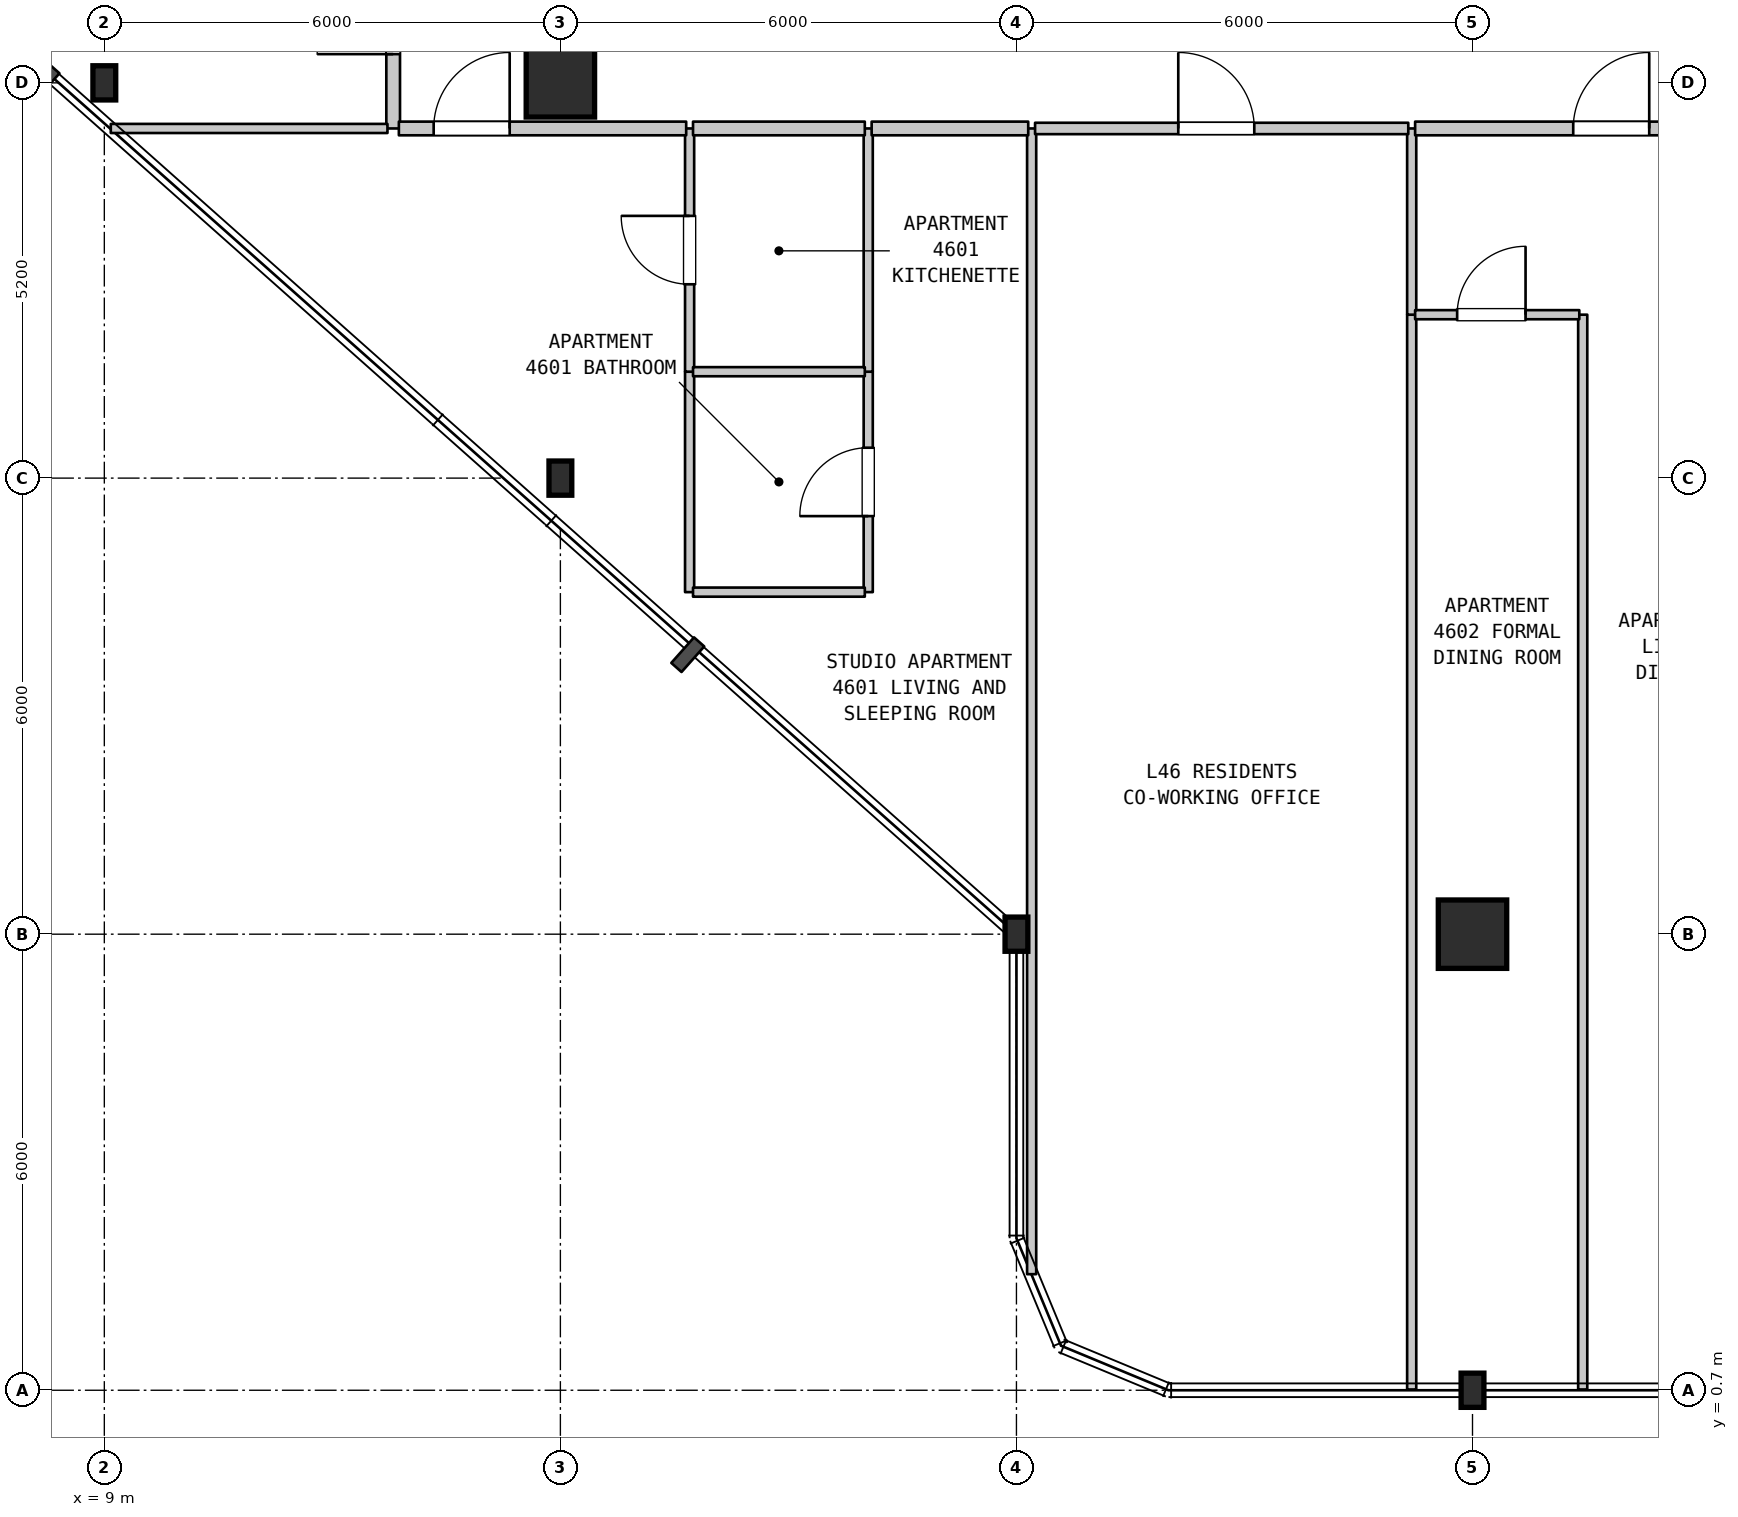
"""IFC4 building model, lengths in metres.
Left out: names, types, materials, properties, quantities, classifications, styles, units other than length and angle.
Written with IfcOpenShell. Run it as: python <this file> out.ifc"""

import sys

from ifc_helpers import new_model, si_unit, direction, frame, frame_2d, origin, origin_2d, place, context, subcontext, project, spatial, rectangle, i_section, extrude, element, fill, save


model = new_model("IFC4")
c1 = context("Model", 3, precision=1e-05, world=origin(), true_north=direction((0.0, 1.0)))
c2 = subcontext(c1, "Body", "Model", "MODEL_VIEW")
j1 = project(units=[si_unit("LENGTHUNIT", "METRE"), si_unit("PLANEANGLEUNIT", "RADIAN")], contexts=[c1])
p1 = place(None, origin())
s1 = spatial("IfcSite", under=j1, at=p1, CompositionType="ELEMENT")
p2 = place(p1, origin())
s2 = spatial("IfcBuilding", under=s1, at=p2, CompositionType="ELEMENT")
p3 = place(p2, frame((0.0, 0.0, 188.4)))
s3 = spatial("IfcBuildingStorey", under=s2, at=p3, CompositionType="ELEMENT", Elevation=188.4)
for number, where, z_axis, x_axis in (
    (1, (9.0, 17.9, 0.0), (0.0, 0.0, 1.0), (1.0, 0.0, 0.0)),
    (2, (15.0, 12.7, 0.0), (0.0, 0.0, 1.0), (1.0, 0.0, 0.0)),
):
    element("IfcColumn", number, at=place(p3, frame(where, z_axis=z_axis, x_axis=x_axis)), inside=s3, PredefinedType="COLUMN", context=c2, shape_type="SweptSolid", body=[
        extrude(i_section(OverallWidth=0.3, OverallDepth=0.45, WebThickness=0.014, FlangeThickness=0.026, FilletRadius=0.027, at=origin_2d()), origin(), (0.0, 0.0, 1.0), 3.7),
    ])
p4 = place(p3, frame((15.0, 17.9, 0.0), z_axis=(0.0, 0.0, 1.0), x_axis=(1.0, 0.0, 0.0)))
e3 = element("IfcColumn", 3, at=p4, inside=s3, PredefinedType="COLUMN", context=c2, shape_type="SweptSolid", body=[
    extrude(rectangle(XDim=0.9, YDim=0.9, at=origin_2d()), origin(), (0.0, 0.0, 1.0), 3.7),
])
for number, where, z_axis, x_axis in (
    (4, (21.0, 6.7, 0.0), (0.0, 0.0, 1.0), (1.0, 0.0, 0.0)),
    (5, (27.0, 0.7, 0.0), (0.0, 0.0, 1.0), (1.0, 0.0, 0.0)),
):
    element("IfcColumn", number, at=place(p3, frame(where, z_axis=z_axis, x_axis=x_axis)), inside=s3, PredefinedType="COLUMN", context=c2, shape_type="SweptSolid", body=[
        extrude(i_section(OverallWidth=0.3, OverallDepth=0.45, WebThickness=0.014, FlangeThickness=0.026, FilletRadius=0.027, at=origin_2d()), origin(), (0.0, 0.0, 1.0), 3.7),
    ])
p5 = place(p3, frame((27.0, 6.7, 0.0), z_axis=(0.0, 0.0, 1.0), x_axis=(1.0, 0.0, 0.0)))
e6 = element("IfcColumn", 6, at=p5, inside=s3, PredefinedType="COLUMN", context=c2, shape_type="SweptSolid", body=[
    extrude(rectangle(XDim=0.9, YDim=0.9, at=origin_2d()), origin(), (0.0, 0.0, 1.0), 3.7),
])
p6 = place(p3, frame((12.8, 17.3, 0.0), z_axis=(0.0, 0.0, 1.0), x_axis=(0.0, 1.0, 0.0)))
e7 = element("IfcWall", 7, at=p6, inside=s3, PredefinedType="STANDARD", context=c2, shape_type="SweptSolid", body=[
    extrude(rectangle(XDim=3.1, YDim=0.18, at=frame_2d((1.55, 0.0))), origin(), (0.0, 0.0, 1.0), 3.39),
])
p7 = place(p6, frame((0.978, 0.0, 0.0)))
e8 = element("IfcOpeningElement", 8, at=p7, cuts=e7, PredefinedType="OPENING", context=c2, shape_type="SweptSolid", body=[
    extrude(rectangle(XDim=1.0, YDim=2.15, at=frame_2d((0.5, 1.075))), frame((0.0, 0.1, 0.0), z_axis=(0.0, -1.0, 0.0), x_axis=(1.0, 0.0, 0.0)), (0.0, 0.0, 1.0), 0.2),
])
p8 = place(p3, frame((16.7, 11.2, 0.0), z_axis=(0.0, 0.0, 1.0), x_axis=(0.0, 1.0, 0.0)))
e9 = element("IfcWall", 9, at=p8, inside=s3, PredefinedType="PARTITIONING", context=c2, shape_type="SweptSolid", body=[
    extrude(rectangle(XDim=2.9, YDim=0.12, at=frame_2d((1.45, 0.0))), origin(), (0.0, 0.0, 1.0), 3.39),
])
p9 = place(p3, frame((16.7, 14.1, 0.0), z_axis=(0.0, 0.0, 1.0), x_axis=(0.0, 1.0, 0.0)))
e10 = element("IfcWall", 10, at=p9, inside=s3, PredefinedType="PARTITIONING", context=c2, shape_type="SweptSolid", body=[
    extrude(rectangle(XDim=3.2, YDim=0.12, at=frame_2d((1.6, 0.0))), origin(), (0.0, 0.0, 1.0), 3.39),
])
p10 = place(p9, frame((1.15, 0.0, 0.0)))
e11 = element("IfcOpeningElement", 11, at=p10, cuts=e10, PredefinedType="OPENING", context=c2, shape_type="SweptSolid", body=[
    extrude(rectangle(XDim=0.9, YDim=2.15, at=frame_2d((0.45, 1.075))), frame((0.0, 0.07, 0.0), z_axis=(0.0, -1.0, 0.0), x_axis=(1.0, 0.0, 0.0)), (0.0, 0.0, 1.0), 0.14),
])
p11 = place(p3, frame((19.05, 11.2, 0.0), z_axis=(0.0, 0.0, 1.0), x_axis=(0.0, 1.0, 0.0)))
e12 = element("IfcWall", 12, at=p11, inside=s3, PredefinedType="PARTITIONING", context=c2, shape_type="SweptSolid", body=[
    extrude(rectangle(XDim=2.9, YDim=0.12, at=frame_2d((1.45, 0.0))), origin(), (0.0, 0.0, 1.0), 3.39),
])
p12 = place(p11, frame((1.0, 0.0, 0.0)))
e13 = element("IfcOpeningElement", 13, at=p12, cuts=e12, PredefinedType="OPENING", context=c2, shape_type="SweptSolid", body=[
    extrude(rectangle(XDim=0.9, YDim=2.1, at=frame_2d((0.45, 1.05))), frame((0.0, 0.07, 0.0), z_axis=(0.0, -1.0, 0.0), x_axis=(1.0, 0.0, 0.0)), (0.0, 0.0, 1.0), 0.14),
])
p13 = place(p3, frame((19.05, 14.1, 0.0), z_axis=(0.0, 0.0, 1.0), x_axis=(0.0, 1.0, 0.0)))
e14 = element("IfcWall", 14, at=p13, inside=s3, PredefinedType="PARTITIONING", context=c2, shape_type="SweptSolid", body=[
    extrude(rectangle(XDim=3.2, YDim=0.12, at=frame_2d((1.6, 0.0))), origin(), (0.0, 0.0, 1.0), 3.39),
])
p14 = place(p3, frame((21.2, 2.227, 0.0), z_axis=(0.0, 0.0, 1.0), x_axis=(0.0, 1.0, 0.0)))
e15 = element("IfcWall", 15, at=p14, inside=s3, PredefinedType="PARTITIONING", context=c2, shape_type="SweptSolid", body=[
    extrude(rectangle(XDim=15.073, YDim=0.12, at=frame_2d((7.537, 0.0))), origin(), (0.0, 0.0, 1.0), 3.39),
])
p15 = place(p3, frame((26.2, 0.71, 0.0), z_axis=(0.0, 0.0, 1.0), x_axis=(0.0, 1.0, 0.0)))
e16 = element("IfcWall", 16, at=p15, inside=s3, PredefinedType="PARTITIONING", context=c2, shape_type="SweptSolid", body=[
    extrude(rectangle(XDim=14.14, YDim=0.12, at=frame_2d((7.07, 0.0))), origin(), (0.0, 0.0, 1.0), 3.39),
])
p16 = place(p3, frame((26.2, 14.85, 0.0), z_axis=(0.0, 0.0, 1.0), x_axis=(0.0, 1.0, 0.0)))
e17 = element("IfcWall", 17, at=p16, inside=s3, PredefinedType="PARTITIONING", context=c2, shape_type="SweptSolid", body=[
    extrude(rectangle(XDim=2.45, YDim=0.12, at=frame_2d((1.225, 0.0))), origin(), (0.0, 0.0, 1.0), 3.39),
])
p17 = place(p3, frame((28.45, 0.71, 0.0), z_axis=(0.0, 0.0, 1.0), x_axis=(0.0, 1.0, 0.0)))
e18 = element("IfcWall", 18, at=p17, inside=s3, PredefinedType="PARTITIONING", context=c2, shape_type="SweptSolid", body=[
    extrude(rectangle(XDim=14.14, YDim=0.12, at=frame_2d((7.07, 0.0))), origin(), (0.0, 0.0, 1.0), 3.39),
])
for number, where, z_axis, x_axis in (
    (19, (16.745, 11.2, 0.0), (0.0, 0.0, 1.0), (1.0, 0.0, 0.0)),
    (20, (16.745, 14.1, 0.0), (0.0, 0.0, 1.0), (1.0, 0.0, 0.0)),
):
    element("IfcWall", number, at=place(p3, frame(where, z_axis=z_axis, x_axis=x_axis)), inside=s3, PredefinedType="PARTITIONING", context=c2, shape_type="SweptSolid", body=[
        extrude(rectangle(XDim=2.26, YDim=0.12, at=frame_2d((1.13, 0.0))), origin(), (0.0, 0.0, 1.0), 3.39),
    ])
p18 = place(p3, frame((26.245, 14.85, 0.0), z_axis=(0.0, 0.0, 1.0), x_axis=(1.0, 0.0, 0.0)))
e21 = element("IfcWall", 21, at=p18, inside=s3, PredefinedType="PARTITIONING", context=c2, shape_type="SweptSolid", body=[
    extrude(rectangle(XDim=2.16, YDim=0.12, at=frame_2d((1.08, 0.0))), origin(), (0.0, 0.0, 1.0), 3.39),
])
p19 = place(p18, frame((0.553, 0.0, 0.0)))
e22 = element("IfcOpeningElement", 22, at=p19, cuts=e21, PredefinedType="OPENING", context=c2, shape_type="SweptSolid", body=[
    extrude(rectangle(XDim=0.9, YDim=2.15, at=frame_2d((0.45, 1.075))), frame((0.0, 0.07, 0.0), z_axis=(0.0, -1.0, 0.0), x_axis=(1.0, 0.0, 0.0)), (0.0, 0.0, 1.0), 0.14),
])
p20 = place(p3, frame((9.085, 17.3, 0.0), z_axis=(0.0, 0.0, 1.0), x_axis=(1.0, 0.0, 0.0)))
e23 = element("IfcWall", 23, at=p20, inside=s3, PredefinedType="PARTITIONING", context=c2, shape_type="SweptSolid", body=[
    extrude(rectangle(XDim=3.64, YDim=0.12, at=frame_2d((1.82, 0.0))), origin(), (0.0, 0.0, 1.0), 3.39),
])
p21 = place(p3, frame((12.875, 17.3, 0.0), z_axis=(0.0, 0.0, 1.0), x_axis=(1.0, 0.0, 0.0)))
e24 = element("IfcWall", 24, at=p21, inside=s3, PredefinedType="STANDARD", context=c2, shape_type="SweptSolid", body=[
    extrude(rectangle(XDim=3.78, YDim=0.18, at=frame_2d((1.89, 0.0))), origin(), (0.0, 0.0, 1.0), 3.39),
])
p22 = place(p21, frame((0.458, 0.0, 0.0)))
e25 = element("IfcOpeningElement", 25, at=p22, cuts=e24, PredefinedType="OPENING", context=c2, shape_type="SweptSolid", body=[
    extrude(rectangle(XDim=1.0, YDim=2.15, at=frame_2d((0.5, 1.075))), frame((0.0, 0.1, 0.0), z_axis=(0.0, -1.0, 0.0), x_axis=(1.0, 0.0, 0.0)), (0.0, 0.0, 1.0), 0.2),
])
p23 = place(p3, frame((16.745, 17.3, 0.0), z_axis=(0.0, 0.0, 1.0), x_axis=(1.0, 0.0, 0.0)))
e26 = element("IfcWall", 26, at=p23, inside=s3, PredefinedType="STANDARD", context=c2, shape_type="SweptSolid", body=[
    extrude(rectangle(XDim=2.26, YDim=0.18, at=frame_2d((1.13, 0.0))), origin(), (0.0, 0.0, 1.0), 3.39),
])
p24 = place(p3, frame((19.095, 17.3, 0.0), z_axis=(0.0, 0.0, 1.0), x_axis=(1.0, 0.0, 0.0)))
e27 = element("IfcWall", 27, at=p24, inside=s3, PredefinedType="STANDARD", context=c2, shape_type="SweptSolid", body=[
    extrude(rectangle(XDim=2.06, YDim=0.18, at=frame_2d((1.03, 0.0))), origin(), (0.0, 0.0, 1.0), 3.39),
])
p25 = place(p3, frame((21.245, 17.3, 0.0), z_axis=(0.0, 0.0, 1.0), x_axis=(1.0, 0.0, 0.0)))
e28 = element("IfcWall", 28, at=p25, inside=s3, PredefinedType="STANDARD", context=c2, shape_type="SweptSolid", body=[
    extrude(rectangle(XDim=4.91, YDim=0.15, at=frame_2d((2.455, 0.0))), origin(), (0.0, 0.0, 1.0), 3.39),
])
p26 = place(p25, frame((1.884, 0.0, 0.0)))
e29 = element("IfcOpeningElement", 29, at=p26, cuts=e28, PredefinedType="OPENING", context=c2, shape_type="SweptSolid", body=[
    extrude(rectangle(XDim=1.0, YDim=2.15, at=frame_2d((0.5, 1.075))), frame((0.0, 0.085, 0.0), z_axis=(0.0, -1.0, 0.0), x_axis=(1.0, 0.0, 0.0)), (0.0, 0.0, 1.0), 0.17),
])
p27 = place(p3, frame((26.245, 17.3, 0.0), z_axis=(0.0, 0.0, 1.0), x_axis=(1.0, 0.0, 0.0)))
e30 = element("IfcWall", 30, at=p27, inside=s3, PredefinedType="STANDARD", context=c2, shape_type="SweptSolid", body=[
    extrude(rectangle(XDim=5.095, YDim=0.18, at=frame_2d((2.547, 0.0))), origin(), (0.0, 0.0, 1.0), 3.39),
])
p28 = place(p27, frame((2.08, 0.0, 0.0)))
e31 = element("IfcOpeningElement", 31, at=p28, cuts=e30, PredefinedType="OPENING", context=c2, shape_type="SweptSolid", body=[
    extrude(rectangle(XDim=1.0, YDim=2.15, at=frame_2d((0.5, 1.075))), frame((0.0, 0.1, 0.0), z_axis=(0.0, -1.0, 0.0), x_axis=(1.0, 0.0, 0.0)), (0.0, 0.0, 1.0), 0.2),
])
p29 = place(p7, origin())
e32 = element("IfcDoor", 32, at=p29, inside=s3, OperationType="SINGLE_SWING_LEFT", PredefinedType="DOOR", context=c2, shape_type="SweptSolid", body=[
    extrude(rectangle(XDim=1.0, YDim=2.15, at=frame_2d((0.5, 1.075))), frame((0.0, 0.025, 0.0), z_axis=(0.0, -1.0, 0.0), x_axis=(1.0, 0.0, 0.0)), (0.0, 0.0, 1.0), 0.05),
])
fill(e8, e32)
p30 = place(p10, origin())
e33 = element("IfcDoor", 33, at=p30, inside=s3, OperationType="SINGLE_SWING_RIGHT", PredefinedType="DOOR", context=c2, shape_type="SweptSolid", body=[
    extrude(rectangle(XDim=0.9, YDim=2.15, at=frame_2d((0.45, 1.075))), frame((0.0, 0.025, 0.0), z_axis=(0.0, -1.0, 0.0), x_axis=(1.0, 0.0, 0.0)), (0.0, 0.0, 1.0), 0.05),
])
fill(e11, e33)
p31 = place(p12, origin())
e34 = element("IfcDoor", 34, at=p31, inside=s3, OperationType="SINGLE_SWING_LEFT", PredefinedType="DOOR", context=c2, shape_type="SweptSolid", body=[
    extrude(rectangle(XDim=0.9, YDim=2.1, at=frame_2d((0.45, 1.05))), frame((0.0, 0.025, 0.0), z_axis=(0.0, -1.0, 0.0), x_axis=(1.0, 0.0, 0.0)), (0.0, 0.0, 1.0), 0.05),
])
fill(e13, e34)
p32 = place(p19, origin())
e35 = element("IfcDoor", 35, at=p32, inside=s3, OperationType="SINGLE_SWING_RIGHT", PredefinedType="DOOR", context=c2, shape_type="SweptSolid", body=[
    extrude(rectangle(XDim=0.9, YDim=2.15, at=frame_2d((0.45, 1.075))), frame((0.0, 0.025, 0.0), z_axis=(0.0, -1.0, 0.0), x_axis=(1.0, 0.0, 0.0)), (0.0, 0.0, 1.0), 0.05),
])
fill(e22, e35)
p33 = place(p22, origin())
e36 = element("IfcDoor", 36, at=p33, inside=s3, OperationType="SINGLE_SWING_RIGHT", PredefinedType="DOOR", context=c2, shape_type="SweptSolid", body=[
    extrude(rectangle(XDim=1.0, YDim=2.15, at=frame_2d((0.5, 1.075))), frame((0.0, 0.025, 0.0), z_axis=(0.0, -1.0, 0.0), x_axis=(1.0, 0.0, 0.0)), (0.0, 0.0, 1.0), 0.05),
])
fill(e25, e36)
p34 = place(p26, origin())
e37 = element("IfcDoor", 37, at=p34, inside=s3, OperationType="SINGLE_SWING_LEFT", PredefinedType="DOOR", context=c2, shape_type="SweptSolid", body=[
    extrude(rectangle(XDim=1.0, YDim=2.15, at=frame_2d((0.5, 1.075))), frame((0.0, 0.025, 0.0), z_axis=(0.0, -1.0, 0.0), x_axis=(1.0, 0.0, 0.0)), (0.0, 0.0, 1.0), 0.05),
])
fill(e29, e37)
p35 = place(p28, origin())
e38 = element("IfcDoor", 38, at=p35, inside=s3, OperationType="SINGLE_SWING_RIGHT", PredefinedType="DOOR", context=c2, shape_type="SweptSolid", body=[
    extrude(rectangle(XDim=1.0, YDim=2.15, at=frame_2d((0.5, 1.075))), frame((0.0, 0.025, 0.0), z_axis=(0.0, -1.0, 0.0), x_axis=(1.0, 0.0, 0.0)), (0.0, 0.0, 1.0), 0.05),
])
fill(e31, e38)
save(model, sys.argv[1])
